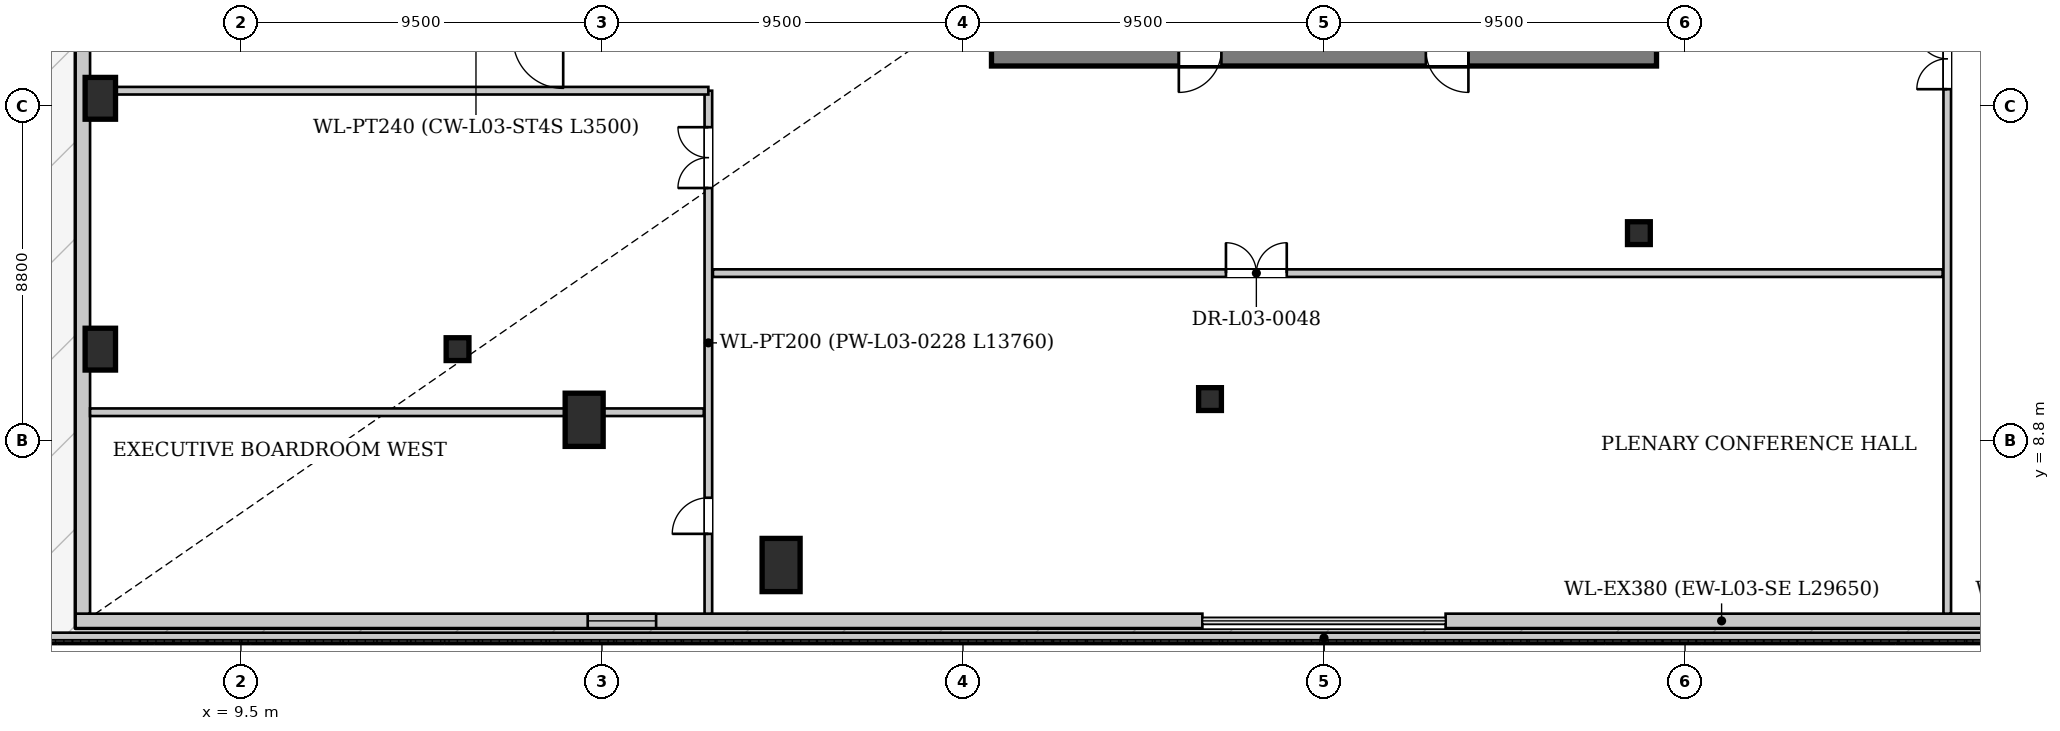
"""IFC4 building model, lengths in metres.
Left out: names, types, materials, properties, quantities, classifications, styles, units other than length and angle.
Written with IfcOpenShell. Run it as: python <this file> out.ifc"""

import sys

from ifc_helpers import new_model, si_unit, direction, frame, frame_2d, origin, origin_2d, place, context, subcontext, project, spatial, rectangle, hollow_rectangle, extrude, source, transform, mapped, element, fill, save


model = new_model("IFC4")
c1 = context("Model", 3, precision=1e-05, world=origin(), true_north=direction((0.0, 1.0)))
c2 = subcontext(c1, "Body", "Model", "MODEL_VIEW")
j1 = project(units=[si_unit("LENGTHUNIT", "METRE"), si_unit("PLANEANGLEUNIT", "RADIAN")], contexts=[c1])
p1 = place(None, origin())
s1 = spatial("IfcSite", under=j1, at=p1, CompositionType="ELEMENT")
p2 = place(p1, origin())
s2 = spatial("IfcBuilding", under=s1, at=p2, CompositionType="ELEMENT")
p3 = place(p2, frame((0.0, 0.0, 15.6)))
s3 = spatial("IfcBuildingStorey", under=s2, at=p3, CompositionType="ELEMENT", Elevation=15.6)
m1 = source(origin(), c2, "Body", "SweptSolid", [
    extrude(rectangle(XDim=1.0, YDim=1.4, at=origin_2d()), origin(), (0.0, 0.0, 1.0), 4.335),
])
for number, where, z_axis, x_axis in (
    (1, (18.532, 9.341, 0.0), (0.0, 0.0, 1.0), (1.0, 0.0, 0.0)),
    (2, (23.714, 5.52, 0.0), (0.0, 0.0, 1.0), (1.0, 0.0, 0.0)),
):
    element("IfcColumn", number, at=place(p3, frame(where, z_axis=z_axis, x_axis=x_axis)), inside=s3, PredefinedType="COLUMN", context=c2, shape_type="MappedRepresentation", body=[
        mapped(m1, transform((0.0, 0.0, 0.0), x_axis=(1.0, 0.0, 0.0), y_axis=(0.0, 1.0, 0.0), z_axis=(0.0, 0.0, 1.0), scale=1.0)),
    ])
m2 = source(origin(), c2, "Body", "SweptSolid", [
    extrude(hollow_rectangle(XDim=0.6, YDim=0.6, WallThickness=0.035, at=origin_2d()), origin(), (0.0, 0.0, 1.0), 4.335),
])
for number, where, z_axis, x_axis in (
    (3, (15.2, 11.2, 0.0), (0.0, 0.0, 1.0), (1.0, 0.0, 0.0)),
    (4, (35.0, 9.886, 0.0), (0.0, 0.0, 1.0), (1.0, 0.0, 0.0)),
    (5, (46.286, 14.252, 0.0), (0.0, 0.0, 1.0), (1.0, 0.0, 0.0)),
):
    element("IfcColumn", number, at=place(p3, frame(where, z_axis=z_axis, x_axis=x_axis)), inside=s3, PredefinedType="COLUMN", context=c2, shape_type="MappedRepresentation", body=[
        mapped(m2, transform((0.0, 0.0, 0.0), x_axis=(1.0, 0.0, 0.0), y_axis=(0.0, 1.0, 0.0), z_axis=(0.0, 0.0, 1.0), scale=1.0)),
    ])
m3 = source(origin(), c2, "Body", "SweptSolid", [
    extrude(rectangle(XDim=0.8, YDim=1.1, at=origin_2d()), origin(), (0.0, 0.0, 1.0), 4.335),
])
for number, where, z_axis, x_axis in (
    (6, (5.8, 11.2, 0.0), (0.0, 0.0, 1.0), (1.0, 0.0, 0.0)),
    (7, (5.8, 17.8, 0.0), (0.0, 0.0, 1.0), (1.0, 0.0, 0.0)),
):
    element("IfcColumn", number, at=place(p3, frame(where, z_axis=z_axis, x_axis=x_axis)), inside=s3, PredefinedType="COLUMN", context=c2, shape_type="MappedRepresentation", body=[
        mapped(m3, transform((0.0, 0.0, 0.0), x_axis=(1.0, 0.0, 0.0), y_axis=(0.0, 1.0, 0.0), z_axis=(0.0, 0.0, 1.0), scale=1.0)),
    ])
p4 = place(p3, frame((70.85, 4.05, 0.0), z_axis=(0.0, 0.0, 1.0), x_axis=(-1.0, 0.0, 0.0)))
e8 = element("IfcWall", 8, at=p4, inside=s3, PredefinedType="SOLIDWALL", context=c2, shape_type="SweptSolid", body=[
    extrude(rectangle(XDim=29.65, YDim=0.38, at=frame_2d((14.825, 0.0))), origin(), (0.0, 0.0, 1.0), 3.622),
])
p5 = place(p4, frame((13.175, 0.0, 0.85)))
e9 = element("IfcOpeningElement", 9, at=p5, cuts=e8, PredefinedType="OPENING", context=c2, shape_type="SweptSolid", body=[
    extrude(rectangle(XDim=1.8, YDim=2.4, at=frame_2d((0.9, 1.2))), frame((0.0, 0.2, 0.0), z_axis=(0.0, -1.0, 0.0), x_axis=(1.0, 0.0, 0.0)), (0.0, 0.0, 1.0), 0.4),
])
p6 = place(p3, frame((34.8, 4.05, 0.0), z_axis=(0.0, 0.0, 1.0), x_axis=(-1.0, 0.0, 0.0)))
e10 = element("IfcWall", 10, at=p6, inside=s3, PredefinedType="SOLIDWALL", context=c2, shape_type="SweptSolid", body=[
    extrude(rectangle(XDim=29.65, YDim=0.38, at=frame_2d((14.825, 0.0))), origin(), (0.0, 0.0, 1.0), 3.622),
])
p7 = place(p6, frame((14.375, 0.0, 0.85)))
e11 = element("IfcOpeningElement", 11, at=p7, cuts=e10, PredefinedType="OPENING", context=c2, shape_type="SweptSolid", body=[
    extrude(rectangle(XDim=1.8, YDim=2.4, at=frame_2d((0.9, 1.2))), frame((0.0, 0.2, 0.0), z_axis=(0.0, -1.0, 0.0), x_axis=(1.0, 0.0, 0.0)), (0.0, 0.0, 1.0), 0.4),
])
p8 = place(p3, frame((5.34, 4.24, 0.0), z_axis=(0.0, 0.0, 1.0), x_axis=(0.0, 1.0, 0.0)))
e12 = element("IfcWall", 12, at=p8, inside=s3, PredefinedType="SOLIDWALL", context=c2, shape_type="SweptSolid", body=[
    extrude(rectangle(XDim=44.72, YDim=0.38, at=frame_2d((22.36, 0.0))), origin(), (0.0, 0.0, 1.0), 3.622),
])
p9 = place(p8, frame((20.81, 0.0, 0.0)))
e13 = element("IfcOpeningElement", 13, at=p9, cuts=e12, PredefinedType="OPENING", context=c2, shape_type="SweptSolid", body=[
    extrude(rectangle(XDim=1.6, YDim=2.3, at=frame_2d((0.8, 1.15))), frame((0.0, 0.2, 0.0), z_axis=(0.0, -1.0, 0.0), x_axis=(1.0, 0.0, 0.0)), (0.0, 0.0, 1.0), 0.4),
])
p10 = place(p3, frame((4.3, 3.6, 0.0), z_axis=(0.0, 0.0, 1.0), x_axis=(1.0, 0.0, 0.0)))
e14 = element("IfcWall", 14, at=p10, inside=s3, PredefinedType="PARAPET", context=c2, shape_type="SweptSolid", body=[
    extrude(rectangle(XDim=67.4, YDim=0.28, at=frame_2d((33.7, 0.0))), origin(), (0.0, 0.0, 1.0), 0.45),
])
p11 = place(p3, frame((46.75, 19.075, 0.0), z_axis=(0.0, 0.0, 1.0), x_axis=(-1.0, 0.0, 0.0)))
e15 = element("IfcWall", 15, at=p11, inside=s3, PredefinedType="SHEAR", context=c2, shape_type="SweptSolid", body=[
    extrude(rectangle(XDim=17.5, YDim=0.85, at=frame_2d((8.75, 0.0))), origin(), (0.0, 0.0, 1.0), 4.18),
])
p12 = place(p11, frame((4.95, 0.0, 0.0)))
e16 = element("IfcOpeningElement", 16, at=p12, cuts=e15, PredefinedType="OPENING", context=c2, shape_type="SweptSolid", body=[
    extrude(rectangle(XDim=1.12, YDim=2.25, at=frame_2d((0.56, 1.125))), frame((0.0, 0.435, 0.0), z_axis=(0.0, -1.0, 0.0), x_axis=(1.0, 0.0, 0.0)), (0.0, 0.0, 1.0), 0.87),
])
p13 = place(p11, frame((11.45, 0.0, 0.0)))
e17 = element("IfcOpeningElement", 17, at=p13, cuts=e15, PredefinedType="OPENING", context=c2, shape_type="SweptSolid", body=[
    extrude(rectangle(XDim=1.12, YDim=2.25, at=frame_2d((0.56, 1.125))), frame((0.0, 0.435, 0.0), z_axis=(0.0, -1.0, 0.0), x_axis=(1.0, 0.0, 0.0)), (0.0, 0.0, 1.0), 0.87),
])
p14 = place(p3, frame((21.8, 4.24, 0.0), z_axis=(0.0, 0.0, 1.0), x_axis=(0.0, 1.0, 0.0)))
e18 = element("IfcWall", 18, at=p14, inside=s3, PredefinedType="PARTITIONING", context=c2, shape_type="SweptSolid", body=[
    extrude(rectangle(XDim=13.76, YDim=0.2, at=frame_2d((6.88, 0.0))), origin(), (0.0, 0.0, 1.0), 3.53),
])
p15 = place(p14, frame((2.1, 0.0, 0.0)))
e19 = element("IfcOpeningElement", 19, at=p15, cuts=e18, PredefinedType="OPENING", context=c2, shape_type="SweptSolid", body=[
    extrude(rectangle(XDim=0.95, YDim=2.1, at=frame_2d((0.475, 1.05))), frame((0.0, 0.11, 0.0), z_axis=(0.0, -1.0, 0.0), x_axis=(1.0, 0.0, 0.0)), (0.0, 0.0, 1.0), 0.22),
])
p16 = place(p14, frame((11.2, 0.0, 0.0)))
e20 = element("IfcOpeningElement", 20, at=p16, cuts=e18, PredefinedType="OPENING", context=c2, shape_type="SweptSolid", body=[
    extrude(rectangle(XDim=1.6, YDim=2.2, at=frame_2d((0.8, 1.1))), frame((0.0, 0.11, 0.0), z_axis=(0.0, -1.0, 0.0), x_axis=(1.0, 0.0, 0.0)), (0.0, 0.0, 1.0), 0.22),
])
p17 = place(p3, frame((5.53, 9.54, 0.0), z_axis=(0.0, 0.0, 1.0), x_axis=(1.0, 0.0, 0.0)))
e21 = element("IfcWall", 21, at=p17, inside=s3, PredefinedType="PARTITIONING", context=c2, shape_type="SweptSolid", body=[
    extrude(rectangle(XDim=16.15, YDim=0.2, at=frame_2d((8.075, 0.0))), origin(), (0.0, 0.0, 1.0), 3.53),
])
p18 = place(p3, frame((5.53, 18.0, 0.0), z_axis=(0.0, 0.0, 1.0), x_axis=(1.0, 0.0, 0.0)))
e22 = element("IfcWall", 22, at=p18, inside=s3, PredefinedType="PARTITIONING", context=c2, shape_type="SweptSolid", body=[
    extrude(rectangle(XDim=16.27, YDim=0.2, at=frame_2d((8.135, 0.0))), origin(), (0.0, 0.0, 1.0), 3.53),
])
p19 = place(p3, frame((21.92, 13.2, 0.0), z_axis=(0.0, 0.0, 1.0), x_axis=(1.0, 0.0, 0.0)))
e23 = element("IfcWall", 23, at=p19, inside=s3, PredefinedType="PARTITIONING", context=c2, shape_type="SweptSolid", body=[
    extrude(rectangle(XDim=32.36, YDim=0.2, at=frame_2d((16.18, 0.0))), origin(), (0.0, 0.0, 1.0), 3.53),
])
p20 = place(p19, frame((13.5, 0.0, 0.0)))
e24 = element("IfcOpeningElement", 24, at=p20, cuts=e23, PredefinedType="OPENING", context=c2, shape_type="SweptSolid", body=[
    extrude(rectangle(XDim=1.6, YDim=2.2, at=frame_2d((0.8, 1.1))), frame((0.0, 0.11, 0.0), z_axis=(0.0, -1.0, 0.0), x_axis=(1.0, 0.0, 0.0)), (0.0, 0.0, 1.0), 0.22),
])
p21 = place(p3, frame((54.4, 4.24, 0.0), z_axis=(0.0, 0.0, 1.0), x_axis=(0.0, 1.0, 0.0)))
e25 = element("IfcWall", 25, at=p21, inside=s3, PredefinedType="PARTITIONING", context=c2, shape_type="SweptSolid", body=[
    extrude(rectangle(XDim=38.56, YDim=0.2, at=frame_2d((19.28, 0.0))), origin(), (0.0, 0.0, 1.0), 3.53),
])
p22 = place(p21, frame((13.8, 0.0, 0.0)))
e26 = element("IfcOpeningElement", 26, at=p22, cuts=e25, PredefinedType="OPENING", context=c2, shape_type="SweptSolid", body=[
    extrude(rectangle(XDim=1.6, YDim=2.2, at=frame_2d((0.8, 1.1))), frame((0.0, 0.11, 0.0), z_axis=(0.0, -1.0, 0.0), x_axis=(1.0, 0.0, 0.0)), (0.0, 0.0, 1.0), 0.22),
])
p23 = place(p21, frame((24.0, 0.0, 0.0)))
e27 = element("IfcOpeningElement", 27, at=p23, cuts=e25, PredefinedType="OPENING", context=c2, shape_type="SweptSolid", body=[
    extrude(rectangle(XDim=1.6, YDim=2.2, at=frame_2d((0.8, 1.1))), frame((0.0, 0.11, 0.0), z_axis=(0.0, -1.0, 0.0), x_axis=(1.0, 0.0, 0.0)), (0.0, 0.0, 1.0), 0.22),
])
m4 = source(origin(), c2, "Body", "SweptSolid", [
    extrude(rectangle(XDim=1.8, YDim=2.4, at=frame_2d((0.9, 1.2))), frame((0.0, 0.03, 0.0), z_axis=(0.0, -1.0, 0.0), x_axis=(1.0, 0.0, 0.0)), (0.0, 0.0, 1.0), 0.06),
])
p24 = place(p7, origin())
e28 = element("IfcWindow", 28, at=p24, inside=s3, PartitioningType="SINGLE_PANEL", PredefinedType="WINDOW", context=c2, shape_type="MappedRepresentation", body=[
    mapped(m4, transform((0.0, 0.0, 0.0), x_axis=(1.0, 0.0, 0.0), y_axis=(0.0, 1.0, 0.0), z_axis=(0.0, 0.0, 1.0), scale=1.0)),
])
fill(e11, e28)
m5 = source(origin(), c2, "Body", "SweptSolid", [
    extrude(rectangle(XDim=0.95, YDim=2.1, at=frame_2d((0.475, 1.05))), frame((0.0, 0.025, 0.0), z_axis=(0.0, -1.0, 0.0), x_axis=(1.0, 0.0, 0.0)), (0.0, 0.0, 1.0), 0.05),
])
p25 = place(p15, origin())
e29 = element("IfcDoor", 29, at=p25, inside=s3, OperationType="SINGLE_SWING_LEFT", PredefinedType="DOOR", context=c2, shape_type="MappedRepresentation", body=[
    mapped(m5, transform((0.0, 0.0, 0.0), x_axis=(1.0, 0.0, 0.0), y_axis=(0.0, 1.0, 0.0), z_axis=(0.0, 0.0, 1.0), scale=1.0)),
])
fill(e19, e29)
m6 = source(origin(), c2, "Body", "SweptSolid", [
    extrude(rectangle(XDim=1.6, YDim=2.2, at=frame_2d((0.8, 1.1))), frame((0.0, 0.025, 0.0), z_axis=(0.0, -1.0, 0.0), x_axis=(1.0, 0.0, 0.0)), (0.0, 0.0, 1.0), 0.05),
])
p26 = place(p16, origin())
e30 = element("IfcDoor", 30, at=p26, inside=s3, OperationType="DOUBLE_DOOR_SINGLE_SWING", PredefinedType="DOOR", context=c2, shape_type="MappedRepresentation", body=[
    mapped(m6, transform((0.0, 0.0, 0.0), x_axis=(1.0, 0.0, 0.0), y_axis=(0.0, 1.0, 0.0), z_axis=(0.0, 0.0, 1.0), scale=1.0)),
])
fill(e20, e30)
p27 = place(p20, origin())
e31 = element("IfcDoor", 31, at=p27, inside=s3, OperationType="DOUBLE_DOOR_SINGLE_SWING", PredefinedType="DOOR", context=c2, shape_type="MappedRepresentation", body=[
    mapped(m6, transform((0.0, 0.0, 0.0), x_axis=(1.0, 0.0, 0.0), y_axis=(0.0, 1.0, 0.0), z_axis=(0.0, 0.0, 1.0), scale=1.0)),
])
fill(e24, e31)
p28 = place(p22, origin())
e32 = element("IfcDoor", 32, at=p28, inside=s3, OperationType="DOUBLE_DOOR_SINGLE_SWING", PredefinedType="DOOR", context=c2, shape_type="MappedRepresentation", body=[
    mapped(m6, transform((0.0, 0.0, 0.0), x_axis=(1.0, 0.0, 0.0), y_axis=(0.0, 1.0, 0.0), z_axis=(0.0, 0.0, 1.0), scale=1.0)),
])
fill(e26, e32)
save(model, sys.argv[1])
